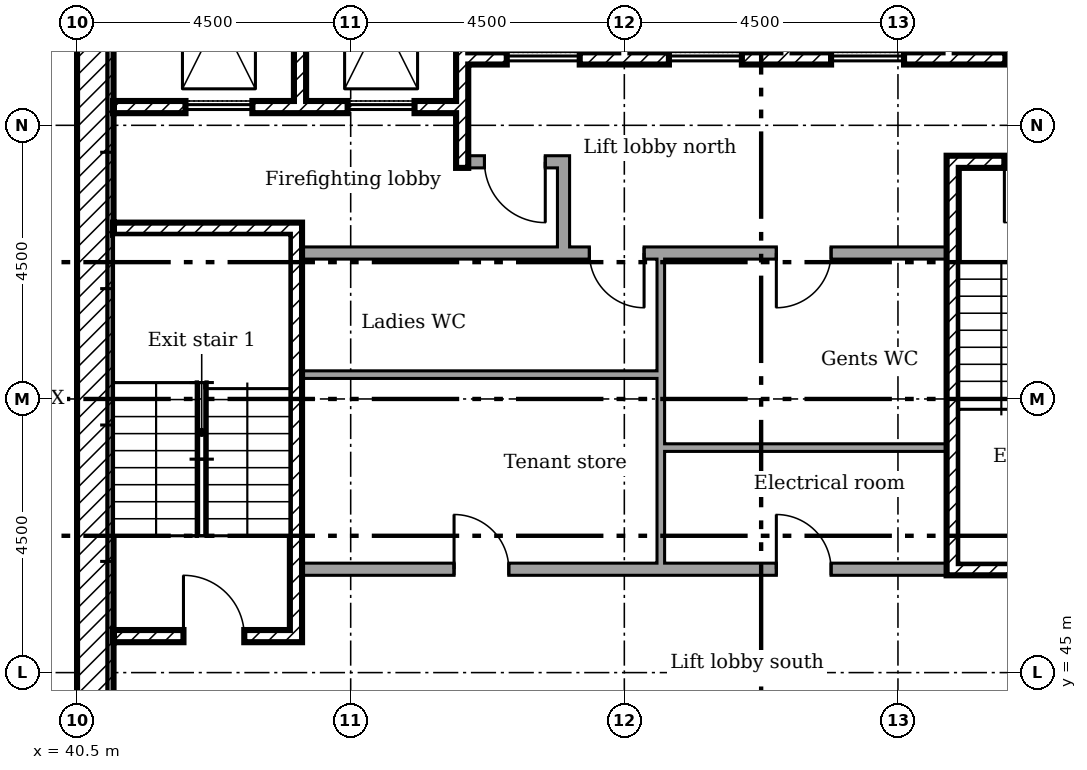
"""IFC4 building model, lengths in metres.
Left out: names, types, materials, properties, quantities, classifications, styles, units other than length and angle.
Written with IfcOpenShell. Run it as: python <this file> out.ifc"""

import sys

from ifc_helpers import new_model, si_unit, direction, frame, frame_2d, origin, place, context, subcontext, project, spatial, rectangle, extrude, element, fill, save


model = new_model("IFC4")
c1 = context("Model", 3, precision=1e-05, world=origin(), true_north=direction((0.0, 1.0)))
c2 = subcontext(c1, "Body", "Model", "MODEL_VIEW")
j1 = project(units=[si_unit("LENGTHUNIT", "METRE"), si_unit("PLANEANGLEUNIT", "RADIAN")], contexts=[c1])
p1 = place(None, origin())
s1 = spatial("IfcSite", under=j1, at=p1, CompositionType="ELEMENT")
p2 = place(p1, origin())
s2 = spatial("IfcBuilding", under=s1, at=p2, CompositionType="ELEMENT")
p3 = place(p2, frame((0.0, 0.0, 183.4)))
s3 = spatial("IfcBuildingStorey", under=s2, at=p3, CompositionType="ELEMENT", Elevation=183.4)
p4 = place(p3, frame((40.8, 41.1, 0.0), z_axis=(0.0, 0.0, 1.0), x_axis=(0.0, 1.0, 0.0)))
e1 = element("IfcWall", 1, at=p4, inside=s3, PredefinedType="SHEAR", context=c2, shape_type="SweptSolid", body=[
    extrude(rectangle(XDim=16.8, YDim=0.6, at=frame_2d((8.4, 0.0))), origin(), (0.0, 0.0, 1.0), 3.35),
])
p5 = place(p3, frame((44.167, 57.9, 0.0), z_axis=(0.0, 0.0, 1.0), x_axis=(0.0, -1.0, 0.0)))
e2 = element("IfcWall", 2, at=p5, inside=s3, PredefinedType="SHEAR", context=c2, shape_type="SweptSolid", body=[
    extrude(rectangle(XDim=3.5, YDim=0.2, at=frame_2d((1.75, 0.0))), origin(), (0.0, 0.0, 1.0), 3.35),
])
p6 = place(p3, frame((46.833, 57.9, 0.0), z_axis=(0.0, 0.0, 1.0), x_axis=(0.0, -1.0, 0.0)))
e3 = element("IfcWall", 3, at=p6, inside=s3, PredefinedType="SHEAR", context=c2, shape_type="SweptSolid", body=[
    extrude(rectangle(XDim=4.6, YDim=0.2, at=frame_2d((2.3, 0.0))), origin(), (0.0, 0.0, 1.0), 3.35),
])
for number, where, z_axis, x_axis in (
    (4, (49.5, 57.9, 0.0), (0.0, 0.0, 1.0), (0.0, -1.0, 0.0)),
    (5, (52.167, 57.9, 0.0), (0.0, 0.0, 1.0), (0.0, -1.0, 0.0)),
    (6, (54.833, 57.9, 0.0), (0.0, 0.0, 1.0), (0.0, -1.0, 0.0)),
):
    element("IfcWall", number, at=place(p3, frame(where, z_axis=z_axis, x_axis=x_axis)), inside=s3, PredefinedType="SHEAR", context=c2, shape_type="SweptSolid", body=[
        extrude(rectangle(XDim=2.7, YDim=0.2, at=frame_2d((1.35, 0.0))), origin(), (0.0, 0.0, 1.0), 3.35),
    ])
p7 = place(p3, frame((48.5, 51.9, 0.0), z_axis=(0.0, 0.0, 1.0), x_axis=(0.0, 1.0, 0.0)))
e7 = element("IfcWall", 7, at=p7, inside=s3, PredefinedType="PARTITIONING", context=c2, shape_type="SweptSolid", body=[
    extrude(rectangle(XDim=1.6, YDim=0.2, at=frame_2d((0.8, 0.0))), origin(), (0.0, 0.0, 1.0), 3.35),
])
p8 = place(p3, frame((46.933, 53.4, 0.0)))
e8 = element("IfcWall", 8, at=p8, inside=s3, PredefinedType="PARTITIONING", context=c2, shape_type="SweptSolid", body=[
    extrude(rectangle(XDim=1.467, YDim=0.2, at=frame_2d((0.733, 0.0))), origin(), (0.0, 0.0, 1.0), 3.35),
])
p9 = place(p8, frame((0.267, 0.0, 0.0)))
e9 = element("IfcOpeningElement", 9, at=p9, cuts=e8, PredefinedType="OPENING", context=c2, shape_type="SweptSolid", body=[
    extrude(rectangle(XDim=1.0, YDim=2.1, at=frame_2d((0.5, 1.05))), frame((0.0, 0.11, 0.0), z_axis=(0.0, -1.0, 0.0), x_axis=(1.0, 0.0, 0.0)), (0.0, 0.0, 1.0), 0.22),
])
p10 = place(p3, frame((46.933, 55.1, 0.0)))
e10 = element("IfcWall", 10, at=p10, inside=s3, PredefinedType="SHEAR", context=c2, shape_type="SweptSolid", body=[
    extrude(rectangle(XDim=10.967, YDim=0.2, at=frame_2d((5.483, 0.0))), origin(), (0.0, 0.0, 1.0), 3.35),
])
p11 = place(p10, frame((8.833, 0.0, 0.0)))
e11 = element("IfcOpeningElement", 11, at=p11, cuts=e10, PredefinedType="OPENING", context=c2, shape_type="SweptSolid", body=[
    extrude(rectangle(XDim=0.9, YDim=2.1, at=frame_2d((0.45, 1.05))), frame((0.0, 0.11, 0.0), z_axis=(0.0, -1.0, 0.0), x_axis=(1.0, 0.0, 0.0)), (0.0, 0.0, 1.0), 0.22),
])
p12 = place(p10, frame((0.633, 0.0, 0.0)))
e12 = element("IfcOpeningElement", 12, at=p12, cuts=e10, PredefinedType="OPENING", context=c2, shape_type="SweptSolid", body=[
    extrude(rectangle(XDim=1.2, YDim=2.1, at=frame_2d((0.6, 1.05))), frame((0.0, 0.11, 0.0), z_axis=(0.0, -1.0, 0.0), x_axis=(1.0, 0.0, 0.0)), (0.0, 0.0, 1.0), 0.22),
])
p13 = place(p10, frame((3.3, 0.0, 0.0)))
e13 = element("IfcOpeningElement", 13, at=p13, cuts=e10, PredefinedType="OPENING", context=c2, shape_type="SweptSolid", body=[
    extrude(rectangle(XDim=1.2, YDim=2.1, at=frame_2d((0.6, 1.05))), frame((0.0, 0.11, 0.0), z_axis=(0.0, -1.0, 0.0), x_axis=(1.0, 0.0, 0.0)), (0.0, 0.0, 1.0), 0.22),
])
p14 = place(p10, frame((5.967, 0.0, 0.0)))
e14 = element("IfcOpeningElement", 14, at=p14, cuts=e10, PredefinedType="OPENING", context=c2, shape_type="SweptSolid", body=[
    extrude(rectangle(XDim=1.2, YDim=2.1, at=frame_2d((0.6, 1.05))), frame((0.0, 0.11, 0.0), z_axis=(0.0, -1.0, 0.0), x_axis=(1.0, 0.0, 0.0)), (0.0, 0.0, 1.0), 0.22),
])
p15 = place(p3, frame((41.1, 54.3, 0.0)))
e15 = element("IfcWall", 15, at=p15, inside=s3, PredefinedType="SHEAR", context=c2, shape_type="SweptSolid", body=[
    extrude(rectangle(XDim=5.633, YDim=0.2, at=frame_2d((2.817, 0.0))), origin(), (0.0, 0.0, 1.0), 3.35),
])
p16 = place(p15, frame((1.183, 0.0, 0.0)))
e16 = element("IfcOpeningElement", 16, at=p16, cuts=e15, PredefinedType="OPENING", context=c2, shape_type="SweptSolid", body=[
    extrude(rectangle(XDim=1.1, YDim=2.1, at=frame_2d((0.55, 1.05))), frame((0.0, 0.11, 0.0), z_axis=(0.0, -1.0, 0.0), x_axis=(1.0, 0.0, 0.0)), (0.0, 0.0, 1.0), 0.22),
])
p17 = place(p15, frame((3.85, 0.0, 0.0)))
e17 = element("IfcOpeningElement", 17, at=p17, cuts=e15, PredefinedType="OPENING", context=c2, shape_type="SweptSolid", body=[
    extrude(rectangle(XDim=1.1, YDim=2.1, at=frame_2d((0.55, 1.05))), frame((0.0, 0.11, 0.0), z_axis=(0.0, -1.0, 0.0), x_axis=(1.0, 0.0, 0.0)), (0.0, 0.0, 1.0), 0.22),
])
p18 = place(p3, frame((44.1, 45.5, 0.0), z_axis=(0.0, 0.0, 1.0), x_axis=(0.0, 1.0, 0.0)))
e18 = element("IfcWall", 18, at=p18, inside=s3, PredefinedType="SHEAR", context=c2, shape_type="SweptSolid", body=[
    extrude(rectangle(XDim=6.9, YDim=0.2, at=frame_2d((3.45, 0.0))), origin(), (0.0, 0.0, 1.0), 3.35),
])
p19 = place(p3, frame((41.1, 52.3, 0.0)))
e19 = element("IfcWall", 19, at=p19, inside=s3, PredefinedType="SHEAR", context=c2, shape_type="SweptSolid", body=[
    extrude(rectangle(XDim=2.9, YDim=0.2, at=frame_2d((1.45, 0.0))), origin(), (0.0, 0.0, 1.0), 3.35),
])
p20 = place(p3, frame((41.1, 45.6, 0.0)))
e20 = element("IfcWall", 20, at=p20, inside=s3, PredefinedType="SHEAR", context=c2, shape_type="SweptSolid", body=[
    extrude(rectangle(XDim=2.9, YDim=0.2, at=frame_2d((1.45, 0.0))), origin(), (0.0, 0.0, 1.0), 3.35),
])
p21 = place(p20, frame((1.15, 0.0, 0.0)))
e21 = element("IfcOpeningElement", 21, at=p21, cuts=e20, PredefinedType="OPENING", context=c2, shape_type="SweptSolid", body=[
    extrude(rectangle(XDim=1.0, YDim=2.1, at=frame_2d((0.5, 1.05))), frame((0.0, 0.11, 0.0), z_axis=(0.0, -1.0, 0.0), x_axis=(1.0, 0.0, 0.0)), (0.0, 0.0, 1.0), 0.22),
])
p22 = place(p3, frame((54.8, 53.4, 0.0)))
e22 = element("IfcWall", 22, at=p22, inside=s3, PredefinedType="SHEAR", context=c2, shape_type="SweptSolid", body=[
    extrude(rectangle(XDim=3.1, YDim=0.2, at=frame_2d((1.55, 0.0))), origin(), (0.0, 0.0, 1.0), 3.35),
])
p23 = place(p22, frame((0.95, 0.0, 0.0)))
e23 = element("IfcOpeningElement", 23, at=p23, cuts=e22, PredefinedType="OPENING", context=c2, shape_type="SweptSolid", body=[
    extrude(rectangle(XDim=1.0, YDim=2.1, at=frame_2d((0.5, 1.05))), frame((0.0, 0.11, 0.0), z_axis=(0.0, -1.0, 0.0), x_axis=(1.0, 0.0, 0.0)), (0.0, 0.0, 1.0), 0.22),
])
p24 = place(p3, frame((54.8, 46.7, 0.0)))
e24 = element("IfcWall", 24, at=p24, inside=s3, PredefinedType="SHEAR", context=c2, shape_type="SweptSolid", body=[
    extrude(rectangle(XDim=3.1, YDim=0.2, at=frame_2d((1.55, 0.0))), origin(), (0.0, 0.0, 1.0), 3.35),
])
p25 = place(p3, frame((54.9, 46.8, 0.0), z_axis=(0.0, 0.0, 1.0), x_axis=(0.0, 1.0, 0.0)))
e25 = element("IfcWall", 25, at=p25, inside=s3, PredefinedType="SHEAR", context=c2, shape_type="SweptSolid", body=[
    extrude(rectangle(XDim=6.5, YDim=0.2, at=frame_2d((3.25, 0.0))), origin(), (0.0, 0.0, 1.0), 3.35),
])
p26 = place(p3, frame((44.2, 51.9, 0.0)))
e26 = element("IfcWall", 26, at=p26, inside=s3, PredefinedType="PARTITIONING", context=c2, shape_type="SweptSolid", body=[
    extrude(rectangle(XDim=10.6, YDim=0.2, at=frame_2d((5.3, 0.0))), origin(), (0.0, 0.0, 1.0), 3.35),
])
p27 = place(p26, frame((4.725, 0.0, 0.0)))
e27 = element("IfcOpeningElement", 27, at=p27, cuts=e26, PredefinedType="OPENING", context=c2, shape_type="SweptSolid", body=[
    extrude(rectangle(XDim=0.9, YDim=2.1, at=frame_2d((0.45, 1.05))), frame((0.0, 0.11, 0.0), z_axis=(0.0, -1.0, 0.0), x_axis=(1.0, 0.0, 0.0)), (0.0, 0.0, 1.0), 0.22),
])
p28 = place(p26, frame((7.8, 0.0, 0.0)))
e28 = element("IfcOpeningElement", 28, at=p28, cuts=e26, PredefinedType="OPENING", context=c2, shape_type="SweptSolid", body=[
    extrude(rectangle(XDim=0.9, YDim=2.1, at=frame_2d((0.45, 1.05))), frame((0.0, 0.11, 0.0), z_axis=(0.0, -1.0, 0.0), x_axis=(1.0, 0.0, 0.0)), (0.0, 0.0, 1.0), 0.22),
])
p29 = place(p3, frame((44.2, 46.7, 0.0)))
e29 = element("IfcWall", 29, at=p29, inside=s3, PredefinedType="PARTITIONING", context=c2, shape_type="SweptSolid", body=[
    extrude(rectangle(XDim=10.6, YDim=0.2, at=frame_2d((5.3, 0.0))), origin(), (0.0, 0.0, 1.0), 3.35),
])
p30 = place(p29, frame((2.5, 0.0, 0.0)))
e30 = element("IfcOpeningElement", 30, at=p30, cuts=e29, PredefinedType="OPENING", context=c2, shape_type="SweptSolid", body=[
    extrude(rectangle(XDim=0.9, YDim=2.1, at=frame_2d((0.45, 1.05))), frame((0.0, 0.11, 0.0), z_axis=(0.0, -1.0, 0.0), x_axis=(1.0, 0.0, 0.0)), (0.0, 0.0, 1.0), 0.22),
])
p31 = place(p29, frame((7.8, 0.0, 0.0)))
e31 = element("IfcOpeningElement", 31, at=p31, cuts=e29, PredefinedType="OPENING", context=c2, shape_type="SweptSolid", body=[
    extrude(rectangle(XDim=0.9, YDim=2.1, at=frame_2d((0.45, 1.05))), frame((0.0, 0.11, 0.0), z_axis=(0.0, -1.0, 0.0), x_axis=(1.0, 0.0, 0.0)), (0.0, 0.0, 1.0), 0.22),
])
p32 = place(p3, frame((50.1, 46.8, 0.0), z_axis=(0.0, 0.0, 1.0), x_axis=(0.0, 1.0, 0.0)))
e32 = element("IfcWall", 32, at=p32, inside=s3, PredefinedType="PARTITIONING", context=c2, shape_type="SweptSolid", body=[
    extrude(rectangle(XDim=1.962, YDim=0.125, at=frame_2d((0.981, 0.0))), origin(), (0.0, 0.0, 1.0), 3.35),
])
p33 = place(p3, frame((54.8, 48.7, 0.0), z_axis=(0.0, 0.0, 1.0), x_axis=(-1.0, 0.0, 0.0)))
e33 = element("IfcWall", 33, at=p33, inside=s3, PredefinedType="PARTITIONING", context=c2, shape_type="SweptSolid", body=[
    extrude(rectangle(XDim=4.637, YDim=0.125, at=frame_2d((2.319, 0.0))), origin(), (0.0, 0.0, 1.0), 3.35),
])
p34 = place(p3, frame((50.1, 48.7, 0.0), z_axis=(0.0, 0.0, 1.0), x_axis=(0.0, 1.0, 0.0)))
e34 = element("IfcWall", 34, at=p34, inside=s3, PredefinedType="PARTITIONING", context=c2, shape_type="SweptSolid", body=[
    extrude(rectangle(XDim=1.262, YDim=0.125, at=frame_2d((0.631, 0.0))), origin(), (0.0, 0.0, 1.0), 3.35),
])
p35 = place(p3, frame((50.038, 49.9, 0.0), z_axis=(0.0, 0.0, 1.0), x_axis=(-1.0, 0.0, 0.0)))
e35 = element("IfcWall", 35, at=p35, inside=s3, PredefinedType="PARTITIONING", context=c2, shape_type="SweptSolid", body=[
    extrude(rectangle(XDim=5.838, YDim=0.125, at=frame_2d((2.919, 0.0))), origin(), (0.0, 0.0, 1.0), 3.35),
])
p36 = place(p3, frame((50.1, 49.9, 0.0), z_axis=(0.0, 0.0, 1.0), x_axis=(0.0, 1.0, 0.0)))
e36 = element("IfcWall", 36, at=p36, inside=s3, PredefinedType="PARTITIONING", context=c2, shape_type="SweptSolid", body=[
    extrude(rectangle(XDim=1.9, YDim=0.125, at=frame_2d((0.95, 0.0))), origin(), (0.0, 0.0, 1.0), 3.35),
])
p37 = place(p21, origin())
e37 = element("IfcDoor", 37, at=p37, inside=s3, OperationType="SINGLE_SWING_RIGHT", PredefinedType="DOOR", context=c2, shape_type="SweptSolid", body=[
    extrude(rectangle(XDim=1.0, YDim=2.1, at=frame_2d((0.5, 1.05))), frame((0.0, 0.025, 0.0), z_axis=(0.0, -1.0, 0.0), x_axis=(1.0, 0.0, 0.0)), (0.0, 0.0, 1.0), 0.05),
])
fill(e21, e37)
p38 = place(p23, frame((1.0, 0.0, 0.0), x_axis=(-1.0, 0.0, 0.0)))
e38 = element("IfcDoor", 38, at=p38, inside=s3, OperationType="SINGLE_SWING_LEFT", PredefinedType="DOOR", context=c2, shape_type="SweptSolid", body=[
    extrude(rectangle(XDim=1.0, YDim=2.1, at=frame_2d((0.5, 1.05))), frame((0.0, 0.025, 0.0), z_axis=(0.0, -1.0, 0.0), x_axis=(1.0, 0.0, 0.0)), (0.0, 0.0, 1.0), 0.05),
])
fill(e23, e38)
p39 = place(p9, frame((1.0, 0.0, 0.0), x_axis=(-1.0, 0.0, 0.0)))
e39 = element("IfcDoor", 39, at=p39, inside=s3, OperationType="SINGLE_SWING_RIGHT", PredefinedType="DOOR", context=c2, shape_type="SweptSolid", body=[
    extrude(rectangle(XDim=1.0, YDim=2.1, at=frame_2d((0.5, 1.05))), frame((0.0, 0.025, 0.0), z_axis=(0.0, -1.0, 0.0), x_axis=(1.0, 0.0, 0.0)), (0.0, 0.0, 1.0), 0.05),
])
fill(e9, e39)
p40 = place(p11, origin())
e40 = element("IfcDoor", 40, at=p40, inside=s3, OperationType="SINGLE_SWING_RIGHT", PredefinedType="DOOR", context=c2, shape_type="SweptSolid", body=[
    extrude(rectangle(XDim=0.9, YDim=2.1, at=frame_2d((0.45, 1.05))), frame((0.0, 0.025, 0.0), z_axis=(0.0, -1.0, 0.0), x_axis=(1.0, 0.0, 0.0)), (0.0, 0.0, 1.0), 0.05),
])
fill(e11, e40)
p41 = place(p30, origin())
e41 = element("IfcDoor", 41, at=p41, inside=s3, OperationType="SINGLE_SWING_RIGHT", PredefinedType="DOOR", context=c2, shape_type="SweptSolid", body=[
    extrude(rectangle(XDim=0.9, YDim=2.1, at=frame_2d((0.45, 1.05))), frame((0.0, 0.025, 0.0), z_axis=(0.0, -1.0, 0.0), x_axis=(1.0, 0.0, 0.0)), (0.0, 0.0, 1.0), 0.05),
])
fill(e30, e41)
p42 = place(p27, frame((0.9, 0.0, 0.0), x_axis=(-1.0, 0.0, 0.0)))
e42 = element("IfcDoor", 42, at=p42, inside=s3, OperationType="SINGLE_SWING_RIGHT", PredefinedType="DOOR", context=c2, shape_type="SweptSolid", body=[
    extrude(rectangle(XDim=0.9, YDim=2.1, at=frame_2d((0.45, 1.05))), frame((0.0, 0.025, 0.0), z_axis=(0.0, -1.0, 0.0), x_axis=(1.0, 0.0, 0.0)), (0.0, 0.0, 1.0), 0.05),
])
fill(e27, e42)
p43 = place(p31, origin())
e43 = element("IfcDoor", 43, at=p43, inside=s3, OperationType="SINGLE_SWING_RIGHT", PredefinedType="DOOR", context=c2, shape_type="SweptSolid", body=[
    extrude(rectangle(XDim=0.9, YDim=2.1, at=frame_2d((0.45, 1.05))), frame((0.0, 0.025, 0.0), z_axis=(0.0, -1.0, 0.0), x_axis=(1.0, 0.0, 0.0)), (0.0, 0.0, 1.0), 0.05),
])
fill(e31, e43)
p44 = place(p28, frame((0.9, 0.0, 0.0), x_axis=(-1.0, 0.0, 0.0)))
e44 = element("IfcDoor", 44, at=p44, inside=s3, OperationType="SINGLE_SWING_LEFT", PredefinedType="DOOR", context=c2, shape_type="SweptSolid", body=[
    extrude(rectangle(XDim=0.9, YDim=2.1, at=frame_2d((0.45, 1.05))), frame((0.0, 0.025, 0.0), z_axis=(0.0, -1.0, 0.0), x_axis=(1.0, 0.0, 0.0)), (0.0, 0.0, 1.0), 0.05),
])
fill(e28, e44)
p45 = place(p16, origin())
e45 = element("IfcDoor", 45, at=p45, inside=s3, OperationType="SLIDING_TO_LEFT", PredefinedType="DOOR", context=c2, shape_type="SweptSolid", body=[
    extrude(rectangle(XDim=1.1, YDim=2.1, at=frame_2d((0.55, 1.05))), frame((0.0, 0.025, 0.0), z_axis=(0.0, -1.0, 0.0), x_axis=(1.0, 0.0, 0.0)), (0.0, 0.0, 1.0), 0.05),
])
fill(e16, e45)
p46 = place(p17, origin())
e46 = element("IfcDoor", 46, at=p46, inside=s3, OperationType="SLIDING_TO_LEFT", PredefinedType="DOOR", context=c2, shape_type="SweptSolid", body=[
    extrude(rectangle(XDim=1.1, YDim=2.1, at=frame_2d((0.55, 1.05))), frame((0.0, 0.025, 0.0), z_axis=(0.0, -1.0, 0.0), x_axis=(1.0, 0.0, 0.0)), (0.0, 0.0, 1.0), 0.05),
])
fill(e17, e46)
p47 = place(p12, origin())
e47 = element("IfcDoor", 47, at=p47, inside=s3, OperationType="SLIDING_TO_LEFT", PredefinedType="DOOR", context=c2, shape_type="SweptSolid", body=[
    extrude(rectangle(XDim=1.2, YDim=2.1, at=frame_2d((0.6, 1.05))), frame((0.0, 0.025, 0.0), z_axis=(0.0, -1.0, 0.0), x_axis=(1.0, 0.0, 0.0)), (0.0, 0.0, 1.0), 0.05),
])
fill(e12, e47)
p48 = place(p13, origin())
e48 = element("IfcDoor", 48, at=p48, inside=s3, OperationType="SLIDING_TO_LEFT", PredefinedType="DOOR", context=c2, shape_type="SweptSolid", body=[
    extrude(rectangle(XDim=1.2, YDim=2.1, at=frame_2d((0.6, 1.05))), frame((0.0, 0.025, 0.0), z_axis=(0.0, -1.0, 0.0), x_axis=(1.0, 0.0, 0.0)), (0.0, 0.0, 1.0), 0.05),
])
fill(e13, e48)
p49 = place(p14, origin())
e49 = element("IfcDoor", 49, at=p49, inside=s3, OperationType="SLIDING_TO_LEFT", PredefinedType="DOOR", context=c2, shape_type="SweptSolid", body=[
    extrude(rectangle(XDim=1.2, YDim=2.1, at=frame_2d((0.6, 1.05))), frame((0.0, 0.025, 0.0), z_axis=(0.0, -1.0, 0.0), x_axis=(1.0, 0.0, 0.0)), (0.0, 0.0, 1.0), 0.05),
])
fill(e14, e49)
save(model, sys.argv[1])
